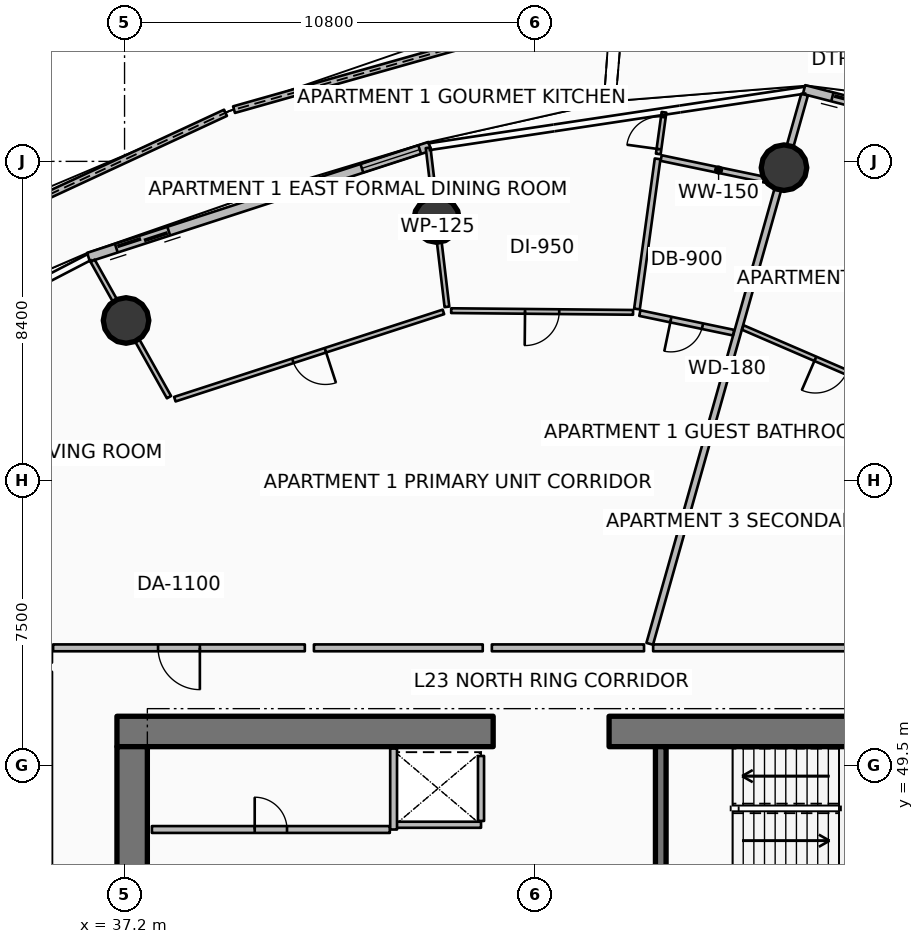
"""IFC4 building model, lengths in metres.
Left out: names, types, materials, properties, quantities, classifications, styles, units other than length and angle.
Written with IfcOpenShell. Run it as: python <this file> out.ifc"""

import sys

from ifc_helpers import new_model, si_unit, direction, frame, frame_2d, origin, origin_2d, place, context, subcontext, project, spatial, polyline, rectangle, circle, outline, extrude, element, fill, save


model = new_model("IFC4")
c1 = context("Model", 3, precision=1e-05, world=origin(), true_north=direction((0.0, 1.0)))
c2 = subcontext(c1, "Body", "Model", "MODEL_VIEW")
j1 = project(units=[si_unit("LENGTHUNIT", "METRE"), si_unit("PLANEANGLEUNIT", "RADIAN")], contexts=[c1])
p1 = place(None, origin())
s1 = spatial("IfcSite", under=j1, at=p1, CompositionType="ELEMENT")
p2 = place(p1, origin())
s2 = spatial("IfcBuilding", under=s1, at=p2, CompositionType="ELEMENT")
p3 = place(p2, frame((0.0, 0.0, 93.9)))
s3 = spatial("IfcBuildingStorey", under=s2, at=p3, CompositionType="ELEMENT", Elevation=93.9)
p4 = place(p3, frame((37.0, 50.4, 0.0), z_axis=(0.0, 0.0, 1.0), x_axis=(1.0, 0.0, 0.0)))
e1 = element("IfcWall", 1, at=p4, inside=s3, PredefinedType="SHEAR", context=c2, shape_type="SweptSolid", body=[
    extrude(rectangle(XDim=9.9, YDim=0.8, at=frame_2d((4.95, 0.0))), origin(), (0.0, 0.0, 1.0), 3.75),
])
p5 = place(p3, frame((49.95, 50.4, 0.0), z_axis=(0.0, 0.0, 1.0), x_axis=(1.0, 0.0, 0.0)))
e2 = element("IfcWall", 2, at=p5, inside=s3, PredefinedType="SHEAR", context=c2, shape_type="SweptSolid", body=[
    extrude(rectangle(XDim=9.9, YDim=0.8, at=frame_2d((4.95, 0.0))), origin(), (0.0, 0.0, 1.0), 3.75),
])
p6 = place(p3, frame((37.4, 34.0, 0.0), z_axis=(0.0, 0.0, 1.0), x_axis=(0.0, 1.0, 0.0)))
e3 = element("IfcWall", 3, at=p6, inside=s3, PredefinedType="SHEAR", context=c2, shape_type="SweptSolid", body=[
    extrude(rectangle(XDim=16.0, YDim=0.8, at=frame_2d((8.0, 0.0))), origin(), (0.0, 0.0, 1.0), 3.75),
])
p7 = place(p3, frame((51.31, 46.5, 0.0), z_axis=(0.0, 0.0, 1.0), x_axis=(0.0, 1.0, 0.0)))
e4 = element("IfcWall", 4, at=p7, inside=s3, PredefinedType="SHEAR", context=c2, shape_type="SweptSolid", body=[
    extrude(rectangle(XDim=3.5, YDim=0.28, at=frame_2d((1.75, 0.0))), origin(), (0.0, 0.0, 1.0), 3.75),
])
for number, where, z_axis, x_axis in (
    (5, (54.553, 65.234, 0.0), (0.0, 0.0, 1.0), (1.0, 0.0, 0.0)),
    (6, (45.412, 63.869, 0.0), (0.0, 0.0, 1.0), (1.0, 0.0, 0.0)),
    (7, (37.24, 61.214, 0.0), (0.0, 0.0, 1.0), (1.0, 0.0, 0.0)),
):
    element("IfcColumn", number, at=place(p3, frame(where, z_axis=z_axis, x_axis=x_axis)), inside=s3, PredefinedType="COLUMN", context=c2, shape_type="SweptSolid", body=[
        extrude(circle(Radius=0.6, at=origin_2d()), origin(), (0.0, 0.0, 1.0), 3.5),
    ])
p8 = place(p3, frame((50.0, 69.564, 0.0), z_axis=(0.0, 0.0, 1.0), x_axis=(-0.962322473133, -0.271910753195, 0.0)))
e8 = element("IfcWall", 8, at=p8, inside=s3, PredefinedType="PARAPET", context=c2, shape_type="SweptSolid", body=[
    extrude(outline(polyline([(0.0, 0.0), (10.308, 0.0), (10.308, 1.632), (5.154, 1.798), (0.0, 1.86), (0.0, 0.0)])), frame((0.0, 0.09, 0.0), z_axis=(0.0, -1.0, 0.0), x_axis=(1.0, 0.0, 0.0)), (0.0, 0.0, 1.0), 0.18),
])
p9 = place(p3, frame((39.856, 66.678, 0.0), z_axis=(0.0, 0.0, 1.0), x_axis=(-0.907065674135, -0.420989148086, 0.0)))
e9 = element("IfcWall", 9, at=p9, inside=s3, PredefinedType="PARAPET", context=c2, shape_type="SweptSolid", body=[
    extrude(outline(polyline([(0.0, 0.0), (10.041, 0.0), (10.042, 1.233), (5.021, 1.418), (0.0, 1.632), (0.0, 0.0)])), frame((0.0, 0.09, 0.0), z_axis=(0.0, -1.0, 0.0), x_axis=(1.0, 0.0, 0.0)), (0.0, 0.0, 1.0), 0.18),
])
p10 = place(p3, frame((65.814, 64.523, 0.0), z_axis=(0.0, 0.0, 1.0), x_axis=(-0.968356180858, 0.249572248045, 0.0)))
e10 = element("IfcWall", 10, at=p10, inside=s3, PredefinedType="SOLIDWALL", context=c2, shape_type="SweptSolid", body=[
    extrude(rectangle(XDim=11.084, YDim=0.24, at=frame_2d((5.542, 0.0))), origin(), (0.0, 0.0, 1.0), 2.45),
])
p11 = place(p10, frame((8.865, 0.0, 0.0)))
e11 = element("IfcOpeningElement", 11, at=p11, cuts=e10, PredefinedType="OPENING", context=c2, shape_type="SweptSolid", body=[
    extrude(rectangle(XDim=1.45, YDim=2.15, at=frame_2d((0.725, 1.075))), frame((0.0, 0.13, 0.0), z_axis=(0.0, -1.0, 0.0), x_axis=(1.0, 0.0, 0.0)), (0.0, 0.0, 1.0), 0.26),
])
p12 = place(p10, frame((0.28, 0.0, 0.65)))
e12 = element("IfcOpeningElement", 12, at=p12, cuts=e10, PredefinedType="OPENING", context=c2, shape_type="SweptSolid", body=[
    extrude(rectangle(XDim=1.6, YDim=1.5, at=frame_2d((0.8, 0.75))), frame((0.0, 0.13, 0.0), z_axis=(0.0, -1.0, 0.0), x_axis=(1.0, 0.0, 0.0)), (0.0, 0.0, 1.0), 0.26),
])
p13 = place(p3, frame((45.233, 65.797, 0.0), z_axis=(0.0, 0.0, 1.0), x_axis=(-0.951052494852, -0.30902937083, 0.0)))
e13 = element("IfcWall", 13, at=p13, inside=s3, PredefinedType="SOLIDWALL", context=c2, shape_type="SweptSolid", body=[
    extrude(rectangle(XDim=9.444, YDim=0.24, at=frame_2d((4.722, 0.0))), origin(), (0.0, 0.0, 1.0), 2.45),
])
p14 = place(p13, frame((7.224, 0.0, 0.0)))
e14 = element("IfcOpeningElement", 14, at=p14, cuts=e13, PredefinedType="OPENING", context=c2, shape_type="SweptSolid", body=[
    extrude(rectangle(XDim=1.45, YDim=2.15, at=frame_2d((0.725, 1.075))), frame((0.0, 0.13, 0.0), z_axis=(0.0, -1.0, 0.0), x_axis=(1.0, 0.0, 0.0)), (0.0, 0.0, 1.0), 0.26),
])
p15 = place(p13, frame((0.28, 0.0, 0.65)))
e15 = element("IfcOpeningElement", 15, at=p15, cuts=e13, PredefinedType="OPENING", context=c2, shape_type="SweptSolid", body=[
    extrude(rectangle(XDim=1.6, YDim=1.5, at=frame_2d((0.8, 0.75))), frame((0.0, 0.13, 0.0), z_axis=(0.0, -1.0, 0.0), x_axis=(1.0, 0.0, 0.0)), (0.0, 0.0, 1.0), 0.26),
])
p16 = place(p3, frame((46.58, 47.945, 0.0), z_axis=(0.0, 0.0, 1.0), x_axis=(-1.0, 0.0, 0.0)))
e16 = element("IfcWall", 16, at=p16, inside=s3, PredefinedType="PARTITIONING", context=c2, shape_type="SweptSolid", body=[
    extrude(rectangle(XDim=2.26, YDim=0.16, at=frame_2d((1.13, 0.0))), origin(), (0.0, 0.0, 1.0), 3.5),
])
p17 = place(p3, frame((46.58, 48.045, 0.0), z_axis=(0.0, 0.0, 1.0), x_axis=(0.0, 1.0, 0.0)))
e17 = element("IfcWall", 17, at=p17, inside=s3, PredefinedType="PARTITIONING", context=c2, shape_type="SweptSolid", body=[
    extrude(rectangle(XDim=1.71, YDim=0.16, at=frame_2d((0.855, 0.0))), origin(), (0.0, 0.0, 1.0), 3.5),
])
p18 = place(p3, frame((37.92, 47.82, 0.0), z_axis=(0.0, 0.0, 1.0), x_axis=(1.0, 0.0, 0.0)))
e18 = element("IfcWall", 18, at=p18, inside=s3, PredefinedType="PARTITIONING", context=c2, shape_type="SweptSolid", body=[
    extrude(rectangle(XDim=6.26, YDim=0.18, at=frame_2d((3.13, 0.0))), origin(), (0.0, 0.0, 1.0), 3.5),
])
p19 = place(p18, frame((2.705, 0.0, 0.0)))
e19 = element("IfcOpeningElement", 19, at=p19, cuts=e18, PredefinedType="OPENING", context=c2, shape_type="SweptSolid", body=[
    extrude(rectangle(XDim=0.85, YDim=2.06, at=frame_2d((0.425, 1.03))), frame((0.0, 0.1, 0.0), z_axis=(0.0, -1.0, 0.0), x_axis=(1.0, 0.0, 0.0)), (0.0, 0.0, 1.0), 0.2),
])
p20 = place(p3, frame((44.28, 47.82, 0.0), z_axis=(0.0, 0.0, 1.0), x_axis=(0.0, 1.0, 0.0)))
e20 = element("IfcWall", 20, at=p20, inside=s3, PredefinedType="PARTITIONING", context=c2, shape_type="SweptSolid", body=[
    extrude(rectangle(XDim=2.13, YDim=0.18, at=frame_2d((1.065, 0.0))), origin(), (0.0, 0.0, 1.0), 3.5),
])
p21 = place(p3, frame((51.019, 52.706, 0.0), z_axis=(0.0, 0.0, 1.0), x_axis=(0.271450895995, 0.962452290279, 0.0)))
e21 = element("IfcWall", 21, at=p21, inside=s3, PredefinedType="PARTITIONING", context=c2, shape_type="SweptSolid", body=[
    extrude(rectangle(XDim=15.014, YDim=0.18, at=frame_2d((7.507, 0.0))), origin(), (0.0, 0.0, 1.0), 2.94),
])
p22 = place(p3, frame((41.944, 52.6, 0.0), z_axis=(0.0, 0.0, 1.0), x_axis=(-1.0, 0.0, 0.0)))
e22 = element("IfcWall", 22, at=p22, inside=s3, PredefinedType="PARTITIONING", context=c2, shape_type="SweptSolid", body=[
    extrude(rectangle(XDim=6.624, YDim=0.18, at=frame_2d((3.312, 0.0))), origin(), (0.0, 0.0, 1.0), 2.94),
])
p23 = place(p22, frame((2.762, 0.0, 0.0)))
e23 = element("IfcOpeningElement", 23, at=p23, cuts=e22, PredefinedType="OPENING", context=c2, shape_type="SweptSolid", body=[
    extrude(rectangle(XDim=1.1, YDim=2.1, at=frame_2d((0.55, 1.05))), frame((0.0, 0.1, 0.0), z_axis=(0.0, -1.0, 0.0), x_axis=(1.0, 0.0, 0.0)), (0.0, 0.0, 1.0), 0.2),
])
p24 = place(p3, frame((50.869, 52.6, 0.0), z_axis=(0.0, 0.0, 1.0), x_axis=(-1.0, 0.0, 0.0)))
e24 = element("IfcWall", 24, at=p24, inside=s3, PredefinedType="PARTITIONING", context=c2, shape_type="SweptSolid", body=[
    extrude(rectangle(XDim=4.004, YDim=0.18, at=frame_2d((2.002, 0.0))), origin(), (0.0, 0.0, 1.0), 2.94),
])
p25 = place(p3, frame((53.225, 60.893, 0.0), z_axis=(0.0, 0.0, 1.0), x_axis=(-0.978917465899, 0.204256199312, 0.0)))
e25 = element("IfcWall", 25, at=p25, inside=s3, PredefinedType="PARTITIONING", context=c2, shape_type="SweptSolid", body=[
    extrude(rectangle(XDim=2.518, YDim=0.15, at=frame_2d((1.259, 0.0))), origin(), (0.0, 0.0, 1.0), 2.94),
])
p26 = place(p25, frame((0.834, 0.0, 0.0)))
e26 = element("IfcOpeningElement", 26, at=p26, cuts=e25, PredefinedType="OPENING", context=c2, shape_type="SweptSolid", body=[
    extrude(rectangle(XDim=0.85, YDim=2.06, at=frame_2d((0.425, 1.03))), frame((0.0, 0.085, 0.0), z_axis=(0.0, -1.0, 0.0), x_axis=(1.0, 0.0, 0.0)), (0.0, 0.0, 1.0), 0.17),
])
p27 = place(p3, frame((54.343, 64.857, 0.0), z_axis=(0.0, 0.0, 1.0), x_axis=(-0.9789132564, 0.2042763727, 0.0)))
e27 = element("IfcWall", 27, at=p27, inside=s3, PredefinedType="PARTITIONING", context=c2, shape_type="SweptSolid", body=[
    extrude(rectangle(XDim=3.087, YDim=0.15, at=frame_2d((1.543, 0.0))), origin(), (0.0, 0.0, 1.0), 2.94),
])
p28 = place(p3, frame((50.684, 61.515, 0.0), z_axis=(0.0, 0.0, 1.0), x_axis=(0.136268658076, 0.990671919874, 0.0)))
e28 = element("IfcWall", 28, at=p28, inside=s3, PredefinedType="PARTITIONING", context=c2, shape_type="SweptSolid", body=[
    extrude(rectangle(XDim=3.988, YDim=0.15, at=frame_2d((1.994, 0.0))), origin(), (0.0, 0.0, 1.0), 2.94),
])
p29 = place(p3, frame((51.245, 65.595, 0.0), z_axis=(0.0, 0.0, 1.0), x_axis=(0.136353678585, 0.990660221436, 0.0)))
e29 = element("IfcWall", 29, at=p29, inside=s3, PredefinedType="PARTITIONING", context=c2, shape_type="SweptSolid", body=[
    extrude(rectangle(XDim=1.106, YDim=0.125, at=frame_2d((0.553, 0.0))), origin(), (0.0, 0.0, 1.0), 2.94),
])
p30 = place(p29, frame((0.128, 0.0, 0.0)))
e30 = element("IfcOpeningElement", 30, at=p30, cuts=e29, PredefinedType="OPENING", context=c2, shape_type="SweptSolid", body=[
    extrude(rectangle(XDim=0.85, YDim=2.06, at=frame_2d((0.425, 1.03))), frame((0.0, 0.073, 0.0), z_axis=(0.0, -1.0, 0.0), x_axis=(1.0, 0.0, 0.0)), (0.0, 0.0, 1.0), 0.145),
])
p31 = place(p3, frame((50.581, 61.427, 0.0), z_axis=(0.0, 0.0, 1.0), x_axis=(-0.999955475908, 0.009436429455, 0.0)))
e31 = element("IfcWall", 31, at=p31, inside=s3, PredefinedType="PARTITIONING", context=c2, shape_type="SweptSolid", body=[
    extrude(rectangle(XDim=4.786, YDim=0.125, at=frame_2d((2.393, 0.0))), origin(), (0.0, 0.0, 1.0), 2.94),
])
p32 = place(p31, frame((1.943, 0.0, 0.0)))
e32 = element("IfcOpeningElement", 32, at=p32, cuts=e31, PredefinedType="OPENING", context=c2, shape_type="SweptSolid", body=[
    extrude(rectangle(XDim=0.9, YDim=2.08, at=frame_2d((0.45, 1.04))), frame((0.0, 0.073, 0.0), z_axis=(0.0, -1.0, 0.0), x_axis=(1.0, 0.0, 0.0)), (0.0, 0.0, 1.0), 0.145),
])
p33 = place(p3, frame((46.625, 52.6, 0.0), z_axis=(0.0, 0.0, 1.0), x_axis=(-1.0, 0.0, 0.0)))
e33 = element("IfcWall", 33, at=p33, inside=s3, PredefinedType="PARTITIONING", context=c2, shape_type="SweptSolid", body=[
    extrude(rectangle(XDim=4.442, YDim=0.18, at=frame_2d((2.221, 0.0))), origin(), (0.0, 0.0, 1.0), 2.94),
])
p34 = place(p3, frame((45.683, 61.573, 0.0), z_axis=(0.0, 0.0, 1.0), x_axis=(-0.117513626782, 0.993071270111, 0.0)))
e34 = element("IfcWall", 34, at=p34, inside=s3, PredefinedType="PARTITIONING", context=c2, shape_type="SweptSolid", body=[
    extrude(rectangle(XDim=4.213, YDim=0.125, at=frame_2d((2.107, 0.0))), origin(), (0.0, 0.0, 1.0), 2.94),
])
p35 = place(p3, frame((38.37, 59.196, 0.0), z_axis=(0.0, 0.0, 1.0), x_axis=(-0.488603368932, 0.87250601595, 0.0)))
e35 = element("IfcWall", 35, at=p35, inside=s3, PredefinedType="PARTITIONING", context=c2, shape_type="SweptSolid", body=[
    extrude(rectangle(XDim=4.113, YDim=0.125, at=frame_2d((2.057, 0.0))), origin(), (0.0, 0.0, 1.0), 2.94),
])
p36 = place(p3, frame((45.591, 61.439, 0.0), z_axis=(0.0, 0.0, 1.0), x_axis=(-0.95105434732, -0.309023669714, 0.0)))
e36 = element("IfcWall", 36, at=p36, inside=s3, PredefinedType="PARTITIONING", context=c2, shape_type="SweptSolid", body=[
    extrude(rectangle(XDim=7.431, YDim=0.125, at=frame_2d((3.716, 0.0))), origin(), (0.0, 0.0, 1.0), 2.94),
])
p37 = place(p36, frame((3.265, 0.0, 0.0)))
e37 = element("IfcOpeningElement", 37, at=p37, cuts=e36, PredefinedType="OPENING", context=c2, shape_type="SweptSolid", body=[
    extrude(rectangle(XDim=0.9, YDim=2.08, at=frame_2d((0.45, 1.04))), frame((0.0, 0.073, 0.0), z_axis=(0.0, -1.0, 0.0), x_axis=(1.0, 0.0, 0.0)), (0.0, 0.0, 1.0), 0.145),
])
p38 = place(p3, frame((56.236, 52.6, 0.0), z_axis=(0.0, 0.0, 1.0), x_axis=(-1.0, 0.0, 0.0)))
e38 = element("IfcWall", 38, at=p38, inside=s3, PredefinedType="PARTITIONING", context=c2, shape_type="SweptSolid", body=[
    extrude(rectangle(XDim=5.127, YDim=0.18, at=frame_2d((2.563, 0.0))), origin(), (0.0, 0.0, 1.0), 2.94),
])
p39 = place(p3, frame((58.112, 59.025, 0.0), z_axis=(0.0, 0.0, 1.0), x_axis=(-0.918133031735, 0.396272300365, 0.0)))
e39 = element("IfcWall", 39, at=p39, inside=s3, PredefinedType="PARTITIONING", context=c2, shape_type="SweptSolid", body=[
    extrude(rectangle(XDim=5.056, YDim=0.125, at=frame_2d((2.528, 0.0))), origin(), (0.0, 0.0, 1.0), 2.94),
])
p40 = place(p39, frame((2.078, 0.0, 0.0)))
e40 = element("IfcOpeningElement", 40, at=p40, cuts=e39, PredefinedType="OPENING", context=c2, shape_type="SweptSolid", body=[
    extrude(rectangle(XDim=0.9, YDim=2.08, at=frame_2d((0.45, 1.04))), frame((0.0, 0.073, 0.0), z_axis=(0.0, -1.0, 0.0), x_axis=(1.0, 0.0, 0.0)), (0.0, 0.0, 1.0), 0.145),
])
p41 = place(p11, origin())
e41 = element("IfcDoor", 41, at=p41, inside=s3, OperationType="DOUBLE_DOOR_SLIDING", PredefinedType="DOOR", context=c2, shape_type="SweptSolid", body=[
    extrude(rectangle(XDim=1.45, YDim=2.15, at=frame_2d((0.725, 1.075))), frame((0.0, 0.025, 0.0), z_axis=(0.0, -1.0, 0.0), x_axis=(1.0, 0.0, 0.0)), (0.0, 0.0, 1.0), 0.05),
])
fill(e11, e41)
p42 = place(p14, origin())
e42 = element("IfcDoor", 42, at=p42, inside=s3, OperationType="DOUBLE_DOOR_SLIDING", PredefinedType="DOOR", context=c2, shape_type="SweptSolid", body=[
    extrude(rectangle(XDim=1.45, YDim=2.15, at=frame_2d((0.725, 1.075))), frame((0.0, 0.025, 0.0), z_axis=(0.0, -1.0, 0.0), x_axis=(1.0, 0.0, 0.0)), (0.0, 0.0, 1.0), 0.05),
])
fill(e14, e42)
p43 = place(p15, origin())
e43 = element("IfcWindow", 43, at=p43, inside=s3, PartitioningType="SINGLE_PANEL", PredefinedType="WINDOW", context=c2, shape_type="SweptSolid", body=[
    extrude(rectangle(XDim=1.6, YDim=1.5, at=frame_2d((0.8, 0.75))), frame((0.0, 0.03, 0.0), z_axis=(0.0, -1.0, 0.0), x_axis=(1.0, 0.0, 0.0)), (0.0, 0.0, 1.0), 0.06),
])
fill(e15, e43)
p44 = place(p19, origin())
e44 = element("IfcDoor", 44, at=p44, inside=s3, OperationType="SINGLE_SWING_LEFT", PredefinedType="DOOR", context=c2, shape_type="SweptSolid", body=[
    extrude(rectangle(XDim=0.85, YDim=2.06, at=frame_2d((0.425, 1.03))), frame((0.0, 0.025, 0.0), z_axis=(0.0, -1.0, 0.0), x_axis=(1.0, 0.0, 0.0)), (0.0, 0.0, 1.0), 0.05),
])
fill(e19, e44)
p45 = place(p23, origin())
e45 = element("IfcDoor", 45, at=p45, inside=s3, OperationType="SINGLE_SWING_LEFT", PredefinedType="DOOR", context=c2, shape_type="SweptSolid", body=[
    extrude(rectangle(XDim=1.1, YDim=2.1, at=frame_2d((0.55, 1.05))), frame((0.0, 0.025, 0.0), z_axis=(0.0, -1.0, 0.0), x_axis=(1.0, 0.0, 0.0)), (0.0, 0.0, 1.0), 0.05),
])
fill(e23, e45)
p46 = place(p26, origin())
e46 = element("IfcDoor", 46, at=p46, inside=s3, OperationType="SINGLE_SWING_RIGHT", PredefinedType="DOOR", context=c2, shape_type="SweptSolid", body=[
    extrude(rectangle(XDim=0.85, YDim=2.06, at=frame_2d((0.425, 1.03))), frame((0.0, 0.025, 0.0), z_axis=(0.0, -1.0, 0.0), x_axis=(1.0, 0.0, 0.0)), (0.0, 0.0, 1.0), 0.05),
])
fill(e26, e46)
p47 = place(p30, origin())
e47 = element("IfcDoor", 47, at=p47, inside=s3, OperationType="SINGLE_SWING_LEFT", PredefinedType="DOOR", context=c2, shape_type="SweptSolid", body=[
    extrude(rectangle(XDim=0.85, YDim=2.06, at=frame_2d((0.425, 1.03))), frame((0.0, 0.025, 0.0), z_axis=(0.0, -1.0, 0.0), x_axis=(1.0, 0.0, 0.0)), (0.0, 0.0, 1.0), 0.05),
])
fill(e30, e47)
p48 = place(p32, origin())
e48 = element("IfcDoor", 48, at=p48, inside=s3, OperationType="SINGLE_SWING_RIGHT", PredefinedType="DOOR", context=c2, shape_type="SweptSolid", body=[
    extrude(rectangle(XDim=0.9, YDim=2.08, at=frame_2d((0.45, 1.04))), frame((0.0, 0.025, 0.0), z_axis=(0.0, -1.0, 0.0), x_axis=(1.0, 0.0, 0.0)), (0.0, 0.0, 1.0), 0.05),
])
fill(e32, e48)
p49 = place(p37, origin())
e49 = element("IfcDoor", 49, at=p49, inside=s3, OperationType="SINGLE_SWING_LEFT", PredefinedType="DOOR", context=c2, shape_type="SweptSolid", body=[
    extrude(rectangle(XDim=0.9, YDim=2.08, at=frame_2d((0.45, 1.04))), frame((0.0, 0.025, 0.0), z_axis=(0.0, -1.0, 0.0), x_axis=(1.0, 0.0, 0.0)), (0.0, 0.0, 1.0), 0.05),
])
fill(e37, e49)
p50 = place(p40, origin())
e50 = element("IfcDoor", 50, at=p50, inside=s3, OperationType="SINGLE_SWING_RIGHT", PredefinedType="DOOR", context=c2, shape_type="SweptSolid", body=[
    extrude(rectangle(XDim=0.9, YDim=2.08, at=frame_2d((0.45, 1.04))), frame((0.0, 0.025, 0.0), z_axis=(0.0, -1.0, 0.0), x_axis=(1.0, 0.0, 0.0)), (0.0, 0.0, 1.0), 0.05),
])
fill(e40, e50)
save(model, sys.argv[1])
